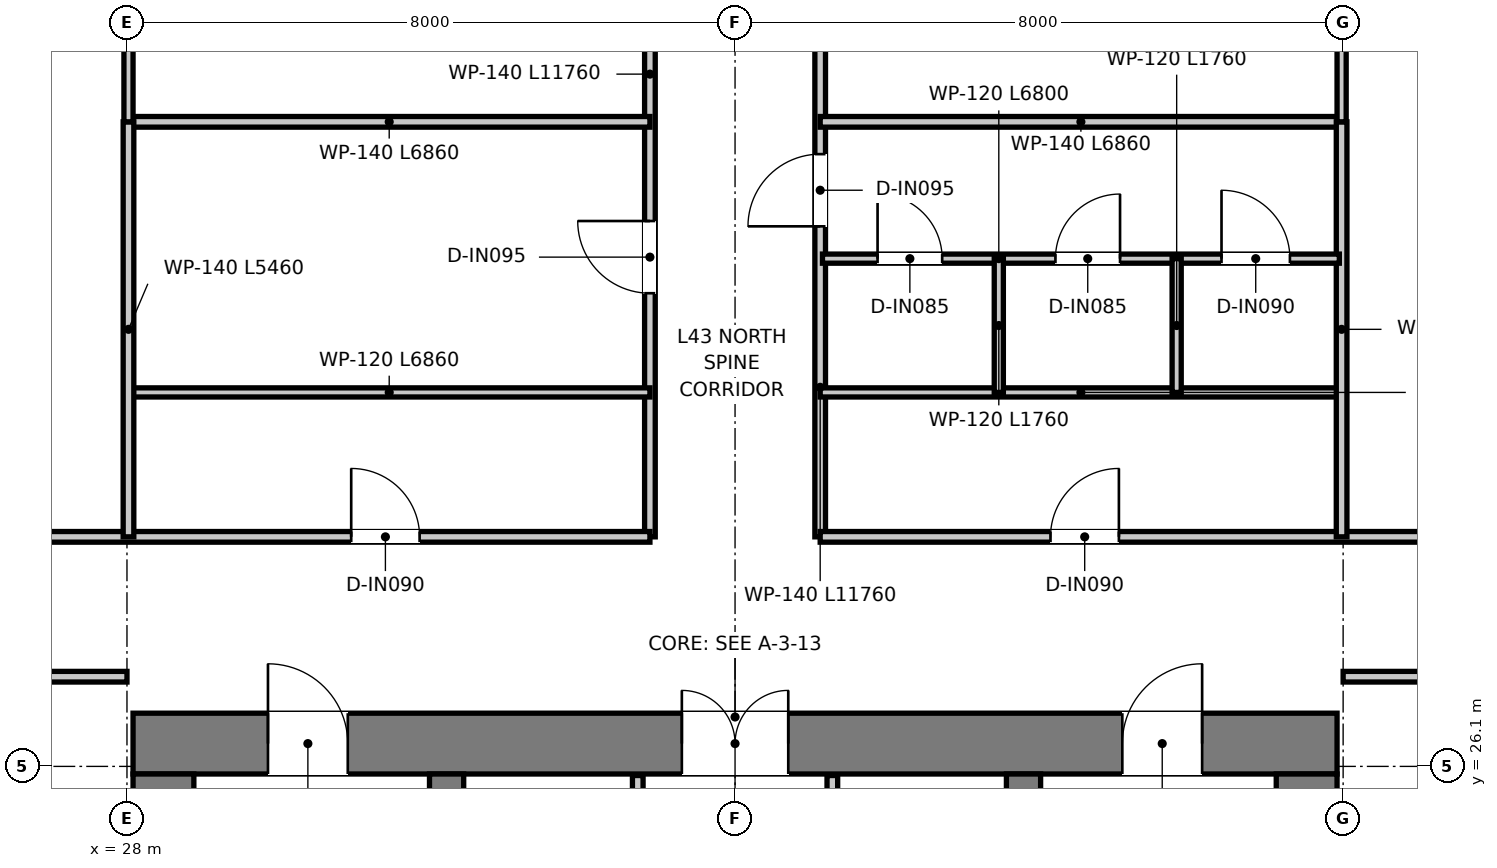
"""IFC4 building model, lengths in metres.
Left out: names, types, materials, properties, quantities, classifications, styles, units other than length and angle.
Written with IfcOpenShell. Run it as: python <this file> out.ifc"""

import sys

from ifc_helpers import new_model, si_unit, direction, frame, frame_2d, origin, place, context, subcontext, project, spatial, rectangle, extrude, element, fill, save


model = new_model("IFC4")
c1 = context("Model", 3, precision=1e-05, world=origin(), true_north=direction((0.0, 1.0)))
c2 = subcontext(c1, "Body", "Model", "MODEL_VIEW")
j1 = project(units=[si_unit("LENGTHUNIT", "METRE"), si_unit("PLANEANGLEUNIT", "RADIAN")], contexts=[c1])
p1 = place(None, origin())
s1 = spatial("IfcSite", under=j1, at=p1, CompositionType="ELEMENT")
p2 = place(p1, origin())
s2 = spatial("IfcBuilding", under=s1, at=p2, CompositionType="ELEMENT")
p3 = place(p2, frame((0.0, 0.0, 177.8)))
s3 = spatial("IfcBuildingStorey", under=s2, at=p3, CompositionType="ELEMENT", Elevation=177.8)
p4 = place(p3, frame((28.08, 26.4, 0.0), z_axis=(0.0, 0.0, 1.0), x_axis=(1.0, 0.0, 0.0)))
e1 = element("IfcWall", 1, at=p4, inside=s3, PredefinedType="SHEAR", context=c2, shape_type="SweptSolid", body=[
    extrude(rectangle(XDim=15.84, YDim=0.8, at=frame_2d((7.92, 0.0))), origin(), (0.0, 0.0, 1.0), 3.95),
])
p5 = place(p4, frame((7.22, 0.0, 0.0)))
e2 = element("IfcOpeningElement", 2, at=p5, cuts=e1, PredefinedType="OPENING", context=c2, shape_type="SweptSolid", body=[
    extrude(rectangle(XDim=1.4, YDim=2.2, at=frame_2d((0.7, 1.1))), frame((0.0, 0.41, 0.0), z_axis=(0.0, -1.0, 0.0), x_axis=(1.0, 0.0, 0.0)), (0.0, 0.0, 1.0), 0.82),
])
p6 = place(p4, frame((1.775, 0.0, 0.0)))
e3 = element("IfcOpeningElement", 3, at=p6, cuts=e1, PredefinedType="OPENING", context=c2, shape_type="SweptSolid", body=[
    extrude(rectangle(XDim=1.05, YDim=2.1, at=frame_2d((0.525, 1.05))), frame((0.0, 0.41, 0.0), z_axis=(0.0, -1.0, 0.0), x_axis=(1.0, 0.0, 0.0)), (0.0, 0.0, 1.0), 0.82),
])
p7 = place(p4, frame((13.015, 0.0, 0.0)))
e4 = element("IfcOpeningElement", 4, at=p7, cuts=e1, PredefinedType="OPENING", context=c2, shape_type="SweptSolid", body=[
    extrude(rectangle(XDim=1.05, YDim=2.1, at=frame_2d((0.525, 1.05))), frame((0.0, 0.41, 0.0), z_axis=(0.0, -1.0, 0.0), x_axis=(1.0, 0.0, 0.0)), (0.0, 0.0, 1.0), 0.82),
])
for number, where, z_axis, x_axis in (
    (5, (28.48, 11.3, 0.0), (0.0, 0.0, 1.0), (0.0, 1.0, 0.0)),
    (6, (43.52, 11.3, 0.0), (0.0, 0.0, 1.0), (0.0, 1.0, 0.0)),
):
    element("IfcWall", number, at=place(p3, frame(where, z_axis=z_axis, x_axis=x_axis)), inside=s3, PredefinedType="SHEAR", context=c2, shape_type="SweptSolid", body=[
        extrude(rectangle(XDim=14.7, YDim=0.8, at=frame_2d((7.35, 0.0))), origin(), (0.0, 0.0, 1.0), 3.95),
    ])
p8 = place(p3, frame((32.205, 13.22, 0.0), z_axis=(0.0, 0.0, 1.0), x_axis=(0.0, 1.0, 0.0)))
e7 = element("IfcWall", 7, at=p8, inside=s3, PredefinedType="SHEAR", context=c2, shape_type="SweptSolid", body=[
    extrude(rectangle(XDim=12.78, YDim=0.45, at=frame_2d((6.39, 0.0))), origin(), (0.0, 0.0, 1.0), 3.95),
])
p9 = place(p8, frame((10.58, 0.0, 0.0)))
e8 = element("IfcOpeningElement", 8, at=p9, cuts=e7, PredefinedType="OPENING", context=c2, shape_type="SweptSolid", body=[
    extrude(rectangle(XDim=1.1, YDim=2.15, at=frame_2d((0.55, 1.075))), frame((0.0, 0.235, 0.0), z_axis=(0.0, -1.0, 0.0), x_axis=(1.0, 0.0, 0.0)), (0.0, 0.0, 1.0), 0.47),
])
p10 = place(p3, frame((39.795, 13.22, 0.0), z_axis=(0.0, 0.0, 1.0), x_axis=(0.0, 1.0, 0.0)))
e9 = element("IfcWall", 9, at=p10, inside=s3, PredefinedType="SHEAR", context=c2, shape_type="SweptSolid", body=[
    extrude(rectangle(XDim=12.78, YDim=0.45, at=frame_2d((6.39, 0.0))), origin(), (0.0, 0.0, 1.0), 3.95),
])
p11 = place(p10, frame((10.58, 0.0, 0.0)))
e10 = element("IfcOpeningElement", 10, at=p11, cuts=e9, PredefinedType="OPENING", context=c2, shape_type="SweptSolid", body=[
    extrude(rectangle(XDim=1.1, YDim=2.15, at=frame_2d((0.55, 1.075))), frame((0.0, 0.235, 0.0), z_axis=(0.0, -1.0, 0.0), x_axis=(1.0, 0.0, 0.0)), (0.0, 0.0, 1.0), 0.47),
])
p12 = place(p3, frame((34.72, 20.2, 0.0), z_axis=(0.0, 0.0, 1.0), x_axis=(0.0, 1.0, 0.0)))
e11 = element("IfcWall", 11, at=p12, inside=s3, PredefinedType="PARTITIONING", context=c2, shape_type="SweptSolid", body=[
    extrude(rectangle(XDim=5.78, YDim=0.14, at=frame_2d((2.89, 0.0))), origin(), (0.0, 0.0, 1.0), 2.67),
])
p13 = place(p12, frame((1.05, 0.0, 0.0)))
e12 = element("IfcOpeningElement", 12, at=p13, cuts=e11, PredefinedType="OPENING", context=c2, shape_type="SweptSolid", body=[
    extrude(rectangle(XDim=0.9, YDim=2.1, at=frame_2d((0.45, 1.05))), frame((0.0, 0.08, 0.0), z_axis=(0.0, -1.0, 0.0), x_axis=(1.0, 0.0, 0.0)), (0.0, 0.0, 1.0), 0.16),
])
p14 = place(p3, frame((37.28, 20.2, 0.0), z_axis=(0.0, 0.0, 1.0), x_axis=(0.0, 1.0, 0.0)))
e13 = element("IfcWall", 13, at=p14, inside=s3, PredefinedType="PARTITIONING", context=c2, shape_type="SweptSolid", body=[
    extrude(rectangle(XDim=5.78, YDim=0.14, at=frame_2d((2.89, 0.0))), origin(), (0.0, 0.0, 1.0), 2.67),
])
p15 = place(p14, frame((0.95, 0.0, 0.0)))
e14 = element("IfcOpeningElement", 14, at=p15, cuts=e13, PredefinedType="OPENING", context=c2, shape_type="SweptSolid", body=[
    extrude(rectangle(XDim=1.1, YDim=2.15, at=frame_2d((0.55, 1.075))), frame((0.0, 0.08, 0.0), z_axis=(0.0, -1.0, 0.0), x_axis=(1.0, 0.0, 0.0)), (0.0, 0.0, 1.0), 0.16),
])
p16 = place(p3, frame((34.88, 29.12, 0.0), z_axis=(0.0, 0.0, 1.0), x_axis=(0.0, 1.0, 0.0)))
e15 = element("IfcWall", 15, at=p16, inside=s3, PredefinedType="PARTITIONING", context=c2, shape_type="SweptSolid", body=[
    extrude(rectangle(XDim=11.76, YDim=0.14, at=frame_2d((5.88, 0.0))), origin(), (0.0, 0.0, 1.0), 3.03),
])
p17 = place(p16, frame((3.205, 0.0, 0.0)))
e16 = element("IfcOpeningElement", 16, at=p17, cuts=e15, PredefinedType="OPENING", context=c2, shape_type="SweptSolid", body=[
    extrude(rectangle(XDim=0.95, YDim=2.1, at=frame_2d((0.475, 1.05))), frame((0.0, 0.08, 0.0), z_axis=(0.0, -1.0, 0.0), x_axis=(1.0, 0.0, 0.0)), (0.0, 0.0, 1.0), 0.16),
])
p18 = place(p16, frame((8.02, 0.0, 0.0)))
e17 = element("IfcOpeningElement", 17, at=p18, cuts=e15, PredefinedType="OPENING", context=c2, shape_type="SweptSolid", body=[
    extrude(rectangle(XDim=0.9, YDim=2.1, at=frame_2d((0.45, 1.05))), frame((0.0, 0.08, 0.0), z_axis=(0.0, -1.0, 0.0), x_axis=(1.0, 0.0, 0.0)), (0.0, 0.0, 1.0), 0.16),
])
p19 = place(p3, frame((37.12, 29.12, 0.0), z_axis=(0.0, 0.0, 1.0), x_axis=(0.0, 1.0, 0.0)))
e18 = element("IfcWall", 18, at=p19, inside=s3, PredefinedType="PARTITIONING", context=c2, shape_type="SweptSolid", body=[
    extrude(rectangle(XDim=11.76, YDim=0.14, at=frame_2d((5.88, 0.0))), origin(), (0.0, 0.0, 1.0), 3.03),
])
p20 = place(p19, frame((4.085, 0.0, 0.0)))
e19 = element("IfcOpeningElement", 19, at=p20, cuts=e18, PredefinedType="OPENING", context=c2, shape_type="SweptSolid", body=[
    extrude(rectangle(XDim=0.95, YDim=2.1, at=frame_2d((0.475, 1.05))), frame((0.0, 0.08, 0.0), z_axis=(0.0, -1.0, 0.0), x_axis=(1.0, 0.0, 0.0)), (0.0, 0.0, 1.0), 0.16),
])
p21 = place(p19, frame((6.82, 0.0, 0.0)))
e20 = element("IfcOpeningElement", 20, at=p21, cuts=e18, PredefinedType="OPENING", context=c2, shape_type="SweptSolid", body=[
    extrude(rectangle(XDim=0.9, YDim=2.1, at=frame_2d((0.45, 1.05))), frame((0.0, 0.08, 0.0), z_axis=(0.0, -1.0, 0.0), x_axis=(1.0, 0.0, 0.0)), (0.0, 0.0, 1.0), 0.16),
])
p22 = place(p19, frame((9.83, 0.0, 0.0)))
e21 = element("IfcOpeningElement", 21, at=p22, cuts=e18, PredefinedType="OPENING", context=c2, shape_type="SweptSolid", body=[
    extrude(rectangle(XDim=0.9, YDim=2.1, at=frame_2d((0.45, 1.05))), frame((0.0, 0.08, 0.0), z_axis=(0.0, -1.0, 0.0), x_axis=(1.0, 0.0, 0.0)), (0.0, 0.0, 1.0), 0.16),
])
p23 = place(p3, frame((11.822, 29.12, 0.0), z_axis=(0.0, 0.0, 1.0), x_axis=(1.0, 0.0, 0.0)))
e22 = element("IfcWall", 22, at=p23, inside=s3, PredefinedType="PARTITIONING", context=c2, shape_type="SweptSolid", body=[
    extrude(rectangle(XDim=23.058, YDim=0.14, at=frame_2d((11.529, 0.0))), origin(), (0.0, 0.0, 1.0), 3.03),
])
p24 = place(p23, frame((19.128, 0.0, 0.0)))
e23 = element("IfcOpeningElement", 23, at=p24, cuts=e22, PredefinedType="OPENING", context=c2, shape_type="SweptSolid", body=[
    extrude(rectangle(XDim=0.9, YDim=2.1, at=frame_2d((0.45, 1.05))), frame((0.0, 0.08, 0.0), z_axis=(0.0, -1.0, 0.0), x_axis=(1.0, 0.0, 0.0)), (0.0, 0.0, 1.0), 0.16),
])
p25 = place(p23, frame((2.137, 0.0, 0.0)))
e24 = element("IfcOpeningElement", 24, at=p25, cuts=e22, PredefinedType="OPENING", context=c2, shape_type="SweptSolid", body=[
    extrude(rectangle(XDim=0.9, YDim=2.1, at=frame_2d((0.45, 1.05))), frame((0.0, 0.08, 0.0), z_axis=(0.0, -1.0, 0.0), x_axis=(1.0, 0.0, 0.0)), (0.0, 0.0, 1.0), 0.16),
])
p26 = place(p23, frame((8.728, 0.0, 0.0)))
e25 = element("IfcOpeningElement", 25, at=p26, cuts=e22, PredefinedType="OPENING", context=c2, shape_type="SweptSolid", body=[
    extrude(rectangle(XDim=0.9, YDim=2.1, at=frame_2d((0.45, 1.05))), frame((0.0, 0.08, 0.0), z_axis=(0.0, -1.0, 0.0), x_axis=(1.0, 0.0, 0.0)), (0.0, 0.0, 1.0), 0.16),
])
p27 = place(p23, frame((11.578, 0.0, 0.0)))
e26 = element("IfcOpeningElement", 26, at=p27, cuts=e22, PredefinedType="OPENING", context=c2, shape_type="SweptSolid", body=[
    extrude(rectangle(XDim=0.9, YDim=2.1, at=frame_2d((0.45, 1.05))), frame((0.0, 0.08, 0.0), z_axis=(0.0, -1.0, 0.0), x_axis=(1.0, 0.0, 0.0)), (0.0, 0.0, 1.0), 0.16),
])
p28 = place(p23, frame((14.128, 0.0, 0.0)))
e27 = element("IfcOpeningElement", 27, at=p28, cuts=e22, PredefinedType="OPENING", context=c2, shape_type="SweptSolid", body=[
    extrude(rectangle(XDim=0.9, YDim=2.1, at=frame_2d((0.45, 1.05))), frame((0.0, 0.08, 0.0), z_axis=(0.0, -1.0, 0.0), x_axis=(1.0, 0.0, 0.0)), (0.0, 0.0, 1.0), 0.16),
])
p29 = place(p3, frame((37.12, 29.12, 0.0), z_axis=(0.0, 0.0, 1.0), x_axis=(1.0, 0.0, 0.0)))
e28 = element("IfcWall", 28, at=p29, inside=s3, PredefinedType="PARTITIONING", context=c2, shape_type="SweptSolid", body=[
    extrude(rectangle(XDim=26.068, YDim=0.14, at=frame_2d((13.034, 0.0))), origin(), (0.0, 0.0, 1.0), 3.03),
])
p30 = place(p29, frame((3.03, 0.0, 0.0)))
e29 = element("IfcOpeningElement", 29, at=p30, cuts=e28, PredefinedType="OPENING", context=c2, shape_type="SweptSolid", body=[
    extrude(rectangle(XDim=0.9, YDim=2.1, at=frame_2d((0.45, 1.05))), frame((0.0, 0.08, 0.0), z_axis=(0.0, -1.0, 0.0), x_axis=(1.0, 0.0, 0.0)), (0.0, 0.0, 1.0), 0.16),
])
p31 = place(p29, frame((15.761, 0.0, 0.0)))
e30 = element("IfcOpeningElement", 30, at=p31, cuts=e28, PredefinedType="OPENING", context=c2, shape_type="SweptSolid", body=[
    extrude(rectangle(XDim=0.9, YDim=2.1, at=frame_2d((0.45, 1.05))), frame((0.0, 0.08, 0.0), z_axis=(0.0, -1.0, 0.0), x_axis=(1.0, 0.0, 0.0)), (0.0, 0.0, 1.0), 0.16),
])
p32 = place(p3, frame((10.678, 27.28, 0.0), z_axis=(0.0, 0.0, 1.0), x_axis=(1.0, 0.0, 0.0)))
e31 = element("IfcWall", 31, at=p32, inside=s3, PredefinedType="PARTITIONING", context=c2, shape_type="SweptSolid", body=[
    extrude(rectangle(XDim=17.322, YDim=0.14, at=frame_2d((8.661, 0.0))), origin(), (0.0, 0.0, 1.0), 3.03),
])
p33 = place(p32, frame((7.231, 0.0, 0.0)))
e32 = element("IfcOpeningElement", 32, at=p33, cuts=e31, PredefinedType="OPENING", context=c2, shape_type="SweptSolid", body=[
    extrude(rectangle(XDim=0.9, YDim=2.1, at=frame_2d((0.45, 1.05))), frame((0.0, 0.08, 0.0), z_axis=(0.0, -1.0, 0.0), x_axis=(1.0, 0.0, 0.0)), (0.0, 0.0, 1.0), 0.16),
])
p34 = place(p3, frame((44.0, 27.28, 0.0), z_axis=(0.0, 0.0, 1.0), x_axis=(1.0, 0.0, 0.0)))
e33 = element("IfcWall", 33, at=p34, inside=s3, PredefinedType="PARTITIONING", context=c2, shape_type="SweptSolid", body=[
    extrude(rectangle(XDim=18.044, YDim=0.14, at=frame_2d((9.022, 0.0))), origin(), (0.0, 0.0, 1.0), 3.03),
])
p35 = place(p34, frame((1.6, 0.0, 0.0)))
e34 = element("IfcOpeningElement", 34, at=p35, cuts=e33, PredefinedType="OPENING", context=c2, shape_type="SweptSolid", body=[
    extrude(rectangle(XDim=0.9, YDim=2.1, at=frame_2d((0.45, 1.05))), frame((0.0, 0.08, 0.0), z_axis=(0.0, -1.0, 0.0), x_axis=(1.0, 0.0, 0.0)), (0.0, 0.0, 1.0), 0.16),
])
p36 = place(p34, frame((4.75, 0.0, 0.0)))
e35 = element("IfcOpeningElement", 35, at=p36, cuts=e33, PredefinedType="OPENING", context=c2, shape_type="SweptSolid", body=[
    extrude(rectangle(XDim=0.9, YDim=2.1, at=frame_2d((0.45, 1.05))), frame((0.0, 0.08, 0.0), z_axis=(0.0, -1.0, 0.0), x_axis=(1.0, 0.0, 0.0)), (0.0, 0.0, 1.0), 0.16),
])
p37 = place(p34, frame((13.191, 0.0, 0.0)))
e36 = element("IfcOpeningElement", 36, at=p37, cuts=e33, PredefinedType="OPENING", context=c2, shape_type="SweptSolid", body=[
    extrude(rectangle(XDim=0.9, YDim=2.1, at=frame_2d((0.45, 1.05))), frame((0.0, 0.08, 0.0), z_axis=(0.0, -1.0, 0.0), x_axis=(1.0, 0.0, 0.0)), (0.0, 0.0, 1.0), 0.16),
])
for number, where, z_axis, x_axis in (
    (37, (28.02, 31.02, 0.0), (0.0, 0.0, 1.0), (1.0, 0.0, 0.0)),
    (38, (37.12, 31.02, 0.0), (0.0, 0.0, 1.0), (1.0, 0.0, 0.0)),
):
    element("IfcWall", number, at=place(p3, frame(where, z_axis=z_axis, x_axis=x_axis)), inside=s3, PredefinedType="PARTITIONING", context=c2, shape_type="SweptSolid", body=[
        extrude(rectangle(XDim=6.86, YDim=0.12, at=frame_2d((3.43, 0.0))), origin(), (0.0, 0.0, 1.0), 3.08),
    ])
for number, where, z_axis, x_axis in (
    (39, (28.02, 34.58, 0.0), (0.0, 0.0, 1.0), (1.0, 0.0, 0.0)),
    (40, (37.12, 34.58, 0.0), (0.0, 0.0, 1.0), (1.0, 0.0, 0.0)),
):
    element("IfcWall", number, at=place(p3, frame(where, z_axis=z_axis, x_axis=x_axis)), inside=s3, PredefinedType="PARTITIONING", context=c2, shape_type="SweptSolid", body=[
        extrude(rectangle(XDim=6.86, YDim=0.14, at=frame_2d((3.43, 0.0))), origin(), (0.0, 0.0, 1.0), 3.08),
    ])
for number, where, z_axis, x_axis in (
    (41, (28.02, 29.12, 0.0), (0.0, 0.0, 1.0), (0.0, 1.0, 0.0)),
    (42, (43.98, 29.12, 0.0), (0.0, 0.0, 1.0), (0.0, 1.0, 0.0)),
):
    element("IfcWall", number, at=place(p3, frame(where, z_axis=z_axis, x_axis=x_axis)), inside=s3, PredefinedType="PARTITIONING", context=c2, shape_type="SweptSolid", body=[
        extrude(rectangle(XDim=5.46, YDim=0.14, at=frame_2d((2.73, 0.0))), origin(), (0.0, 0.0, 1.0), 3.31),
    ])
p38 = place(p3, frame((37.15, 32.78, 0.0), z_axis=(0.0, 0.0, 1.0), x_axis=(1.0, 0.0, 0.0)))
e43 = element("IfcWall", 43, at=p38, inside=s3, PredefinedType="PARTITIONING", context=c2, shape_type="SweptSolid", body=[
    extrude(rectangle(XDim=6.8, YDim=0.12, at=frame_2d((3.4, 0.0))), origin(), (0.0, 0.0, 1.0), 3.08),
])
p39 = place(p38, frame((0.725, 0.0, 0.0)))
e44 = element("IfcOpeningElement", 44, at=p39, cuts=e43, PredefinedType="OPENING", context=c2, shape_type="SweptSolid", body=[
    extrude(rectangle(XDim=0.85, YDim=2.1, at=frame_2d((0.425, 1.05))), frame((0.0, 0.07, 0.0), z_axis=(0.0, -1.0, 0.0), x_axis=(1.0, 0.0, 0.0)), (0.0, 0.0, 1.0), 0.14),
])
p40 = place(p38, frame((3.065, 0.0, 0.0)))
e45 = element("IfcOpeningElement", 45, at=p40, cuts=e43, PredefinedType="OPENING", context=c2, shape_type="SweptSolid", body=[
    extrude(rectangle(XDim=0.85, YDim=2.1, at=frame_2d((0.425, 1.05))), frame((0.0, 0.07, 0.0), z_axis=(0.0, -1.0, 0.0), x_axis=(1.0, 0.0, 0.0)), (0.0, 0.0, 1.0), 0.14),
])
p41 = place(p38, frame((5.25, 0.0, 0.0)))
e46 = element("IfcOpeningElement", 46, at=p41, cuts=e43, PredefinedType="OPENING", context=c2, shape_type="SweptSolid", body=[
    extrude(rectangle(XDim=0.9, YDim=2.1, at=frame_2d((0.45, 1.05))), frame((0.0, 0.07, 0.0), z_axis=(0.0, -1.0, 0.0), x_axis=(1.0, 0.0, 0.0)), (0.0, 0.0, 1.0), 0.14),
])
for number, where, z_axis, x_axis in (
    (47, (39.47, 31.02, 0.0), (0.0, 0.0, 1.0), (0.0, 1.0, 0.0)),
    (48, (41.81, 31.02, 0.0), (0.0, 0.0, 1.0), (0.0, 1.0, 0.0)),
):
    element("IfcWall", number, at=place(p3, frame(where, z_axis=z_axis, x_axis=x_axis)), inside=s3, PredefinedType="PARTITIONING", context=c2, shape_type="SweptSolid", body=[
        extrude(rectangle(XDim=1.76, YDim=0.12, at=frame_2d((0.88, 0.0))), origin(), (0.0, 0.0, 1.0), 3.67),
    ])
p42 = place(p3, frame((28.02, 34.58, 0.0), z_axis=(0.0, 0.0, 1.0), x_axis=(0.0, 1.0, 0.0)))
e49 = element("IfcWall", 49, at=p42, inside=s3, PredefinedType="PARTITIONING", context=c2, shape_type="SweptSolid", body=[
    extrude(rectangle(XDim=17.307, YDim=0.12, at=frame_2d((8.654, 0.0))), origin(), (0.0, 0.0, 1.0), 3.03),
])
p43 = place(p3, frame((43.98, 34.58, 0.0), z_axis=(0.0, 0.0, 1.0), x_axis=(0.0, 1.0, 0.0)))
e50 = element("IfcWall", 50, at=p43, inside=s3, PredefinedType="PARTITIONING", context=c2, shape_type="SweptSolid", body=[
    extrude(rectangle(XDim=12.841, YDim=0.12, at=frame_2d((6.42, 0.0))), origin(), (0.0, 0.0, 1.0), 3.03),
])
p44 = place(p5, origin())
e51 = element("IfcDoor", 51, at=p44, inside=s3, OperationType="DOUBLE_DOOR_SINGLE_SWING", PredefinedType="DOOR", context=c2, shape_type="SweptSolid", body=[
    extrude(rectangle(XDim=1.4, YDim=2.2, at=frame_2d((0.7, 1.1))), frame((0.0, 0.025, 0.0), z_axis=(0.0, -1.0, 0.0), x_axis=(1.0, 0.0, 0.0)), (0.0, 0.0, 1.0), 0.05),
])
fill(e2, e51)
p45 = place(p6, origin())
e52 = element("IfcDoor", 52, at=p45, inside=s3, OperationType="SINGLE_SWING_LEFT", PredefinedType="DOOR", context=c2, shape_type="SweptSolid", body=[
    extrude(rectangle(XDim=1.05, YDim=2.1, at=frame_2d((0.525, 1.05))), frame((0.0, 0.025, 0.0), z_axis=(0.0, -1.0, 0.0), x_axis=(1.0, 0.0, 0.0)), (0.0, 0.0, 1.0), 0.05),
])
fill(e3, e52)
p46 = place(p7, origin())
e53 = element("IfcDoor", 53, at=p46, inside=s3, OperationType="SINGLE_SWING_RIGHT", PredefinedType="DOOR", context=c2, shape_type="SweptSolid", body=[
    extrude(rectangle(XDim=1.05, YDim=2.1, at=frame_2d((0.525, 1.05))), frame((0.0, 0.025, 0.0), z_axis=(0.0, -1.0, 0.0), x_axis=(1.0, 0.0, 0.0)), (0.0, 0.0, 1.0), 0.05),
])
fill(e4, e53)
p47 = place(p24, origin())
e54 = element("IfcDoor", 54, at=p47, inside=s3, OperationType="SINGLE_SWING_LEFT", PredefinedType="DOOR", context=c2, shape_type="SweptSolid", body=[
    extrude(rectangle(XDim=0.9, YDim=2.1, at=frame_2d((0.45, 1.05))), frame((0.0, 0.025, 0.0), z_axis=(0.0, -1.0, 0.0), x_axis=(1.0, 0.0, 0.0)), (0.0, 0.0, 1.0), 0.05),
])
fill(e23, e54)
p48 = place(p30, origin())
e55 = element("IfcDoor", 55, at=p48, inside=s3, OperationType="SINGLE_SWING_RIGHT", PredefinedType="DOOR", context=c2, shape_type="SweptSolid", body=[
    extrude(rectangle(XDim=0.9, YDim=2.1, at=frame_2d((0.45, 1.05))), frame((0.0, 0.025, 0.0), z_axis=(0.0, -1.0, 0.0), x_axis=(1.0, 0.0, 0.0)), (0.0, 0.0, 1.0), 0.05),
])
fill(e29, e55)
p49 = place(p20, origin())
e56 = element("IfcDoor", 56, at=p49, inside=s3, OperationType="SINGLE_SWING_LEFT", PredefinedType="DOOR", context=c2, shape_type="SweptSolid", body=[
    extrude(rectangle(XDim=0.95, YDim=2.1, at=frame_2d((0.475, 1.05))), frame((0.0, 0.025, 0.0), z_axis=(0.0, -1.0, 0.0), x_axis=(1.0, 0.0, 0.0)), (0.0, 0.0, 1.0), 0.05),
])
fill(e19, e56)
p50 = place(p17, origin())
e57 = element("IfcDoor", 57, at=p50, inside=s3, OperationType="SINGLE_SWING_RIGHT", PredefinedType="DOOR", context=c2, shape_type="SweptSolid", body=[
    extrude(rectangle(XDim=0.95, YDim=2.1, at=frame_2d((0.475, 1.05))), frame((0.0, 0.025, 0.0), z_axis=(0.0, -1.0, 0.0), x_axis=(1.0, 0.0, 0.0)), (0.0, 0.0, 1.0), 0.05),
])
fill(e16, e57)
p51 = place(p39, origin())
e58 = element("IfcDoor", 58, at=p51, inside=s3, OperationType="SINGLE_SWING_LEFT", PredefinedType="DOOR", context=c2, shape_type="SweptSolid", body=[
    extrude(rectangle(XDim=0.85, YDim=2.1, at=frame_2d((0.425, 1.05))), frame((0.0, 0.025, 0.0), z_axis=(0.0, -1.0, 0.0), x_axis=(1.0, 0.0, 0.0)), (0.0, 0.0, 1.0), 0.05),
])
fill(e44, e58)
p52 = place(p40, origin())
e59 = element("IfcDoor", 59, at=p52, inside=s3, OperationType="SINGLE_SWING_RIGHT", PredefinedType="DOOR", context=c2, shape_type="SweptSolid", body=[
    extrude(rectangle(XDim=0.85, YDim=2.1, at=frame_2d((0.425, 1.05))), frame((0.0, 0.025, 0.0), z_axis=(0.0, -1.0, 0.0), x_axis=(1.0, 0.0, 0.0)), (0.0, 0.0, 1.0), 0.05),
])
fill(e45, e59)
p53 = place(p41, origin())
e60 = element("IfcDoor", 60, at=p53, inside=s3, OperationType="SINGLE_SWING_LEFT", PredefinedType="DOOR", context=c2, shape_type="SweptSolid", body=[
    extrude(rectangle(XDim=0.9, YDim=2.1, at=frame_2d((0.45, 1.05))), frame((0.0, 0.025, 0.0), z_axis=(0.0, -1.0, 0.0), x_axis=(1.0, 0.0, 0.0)), (0.0, 0.0, 1.0), 0.05),
])
fill(e46, e60)
save(model, sys.argv[1])
